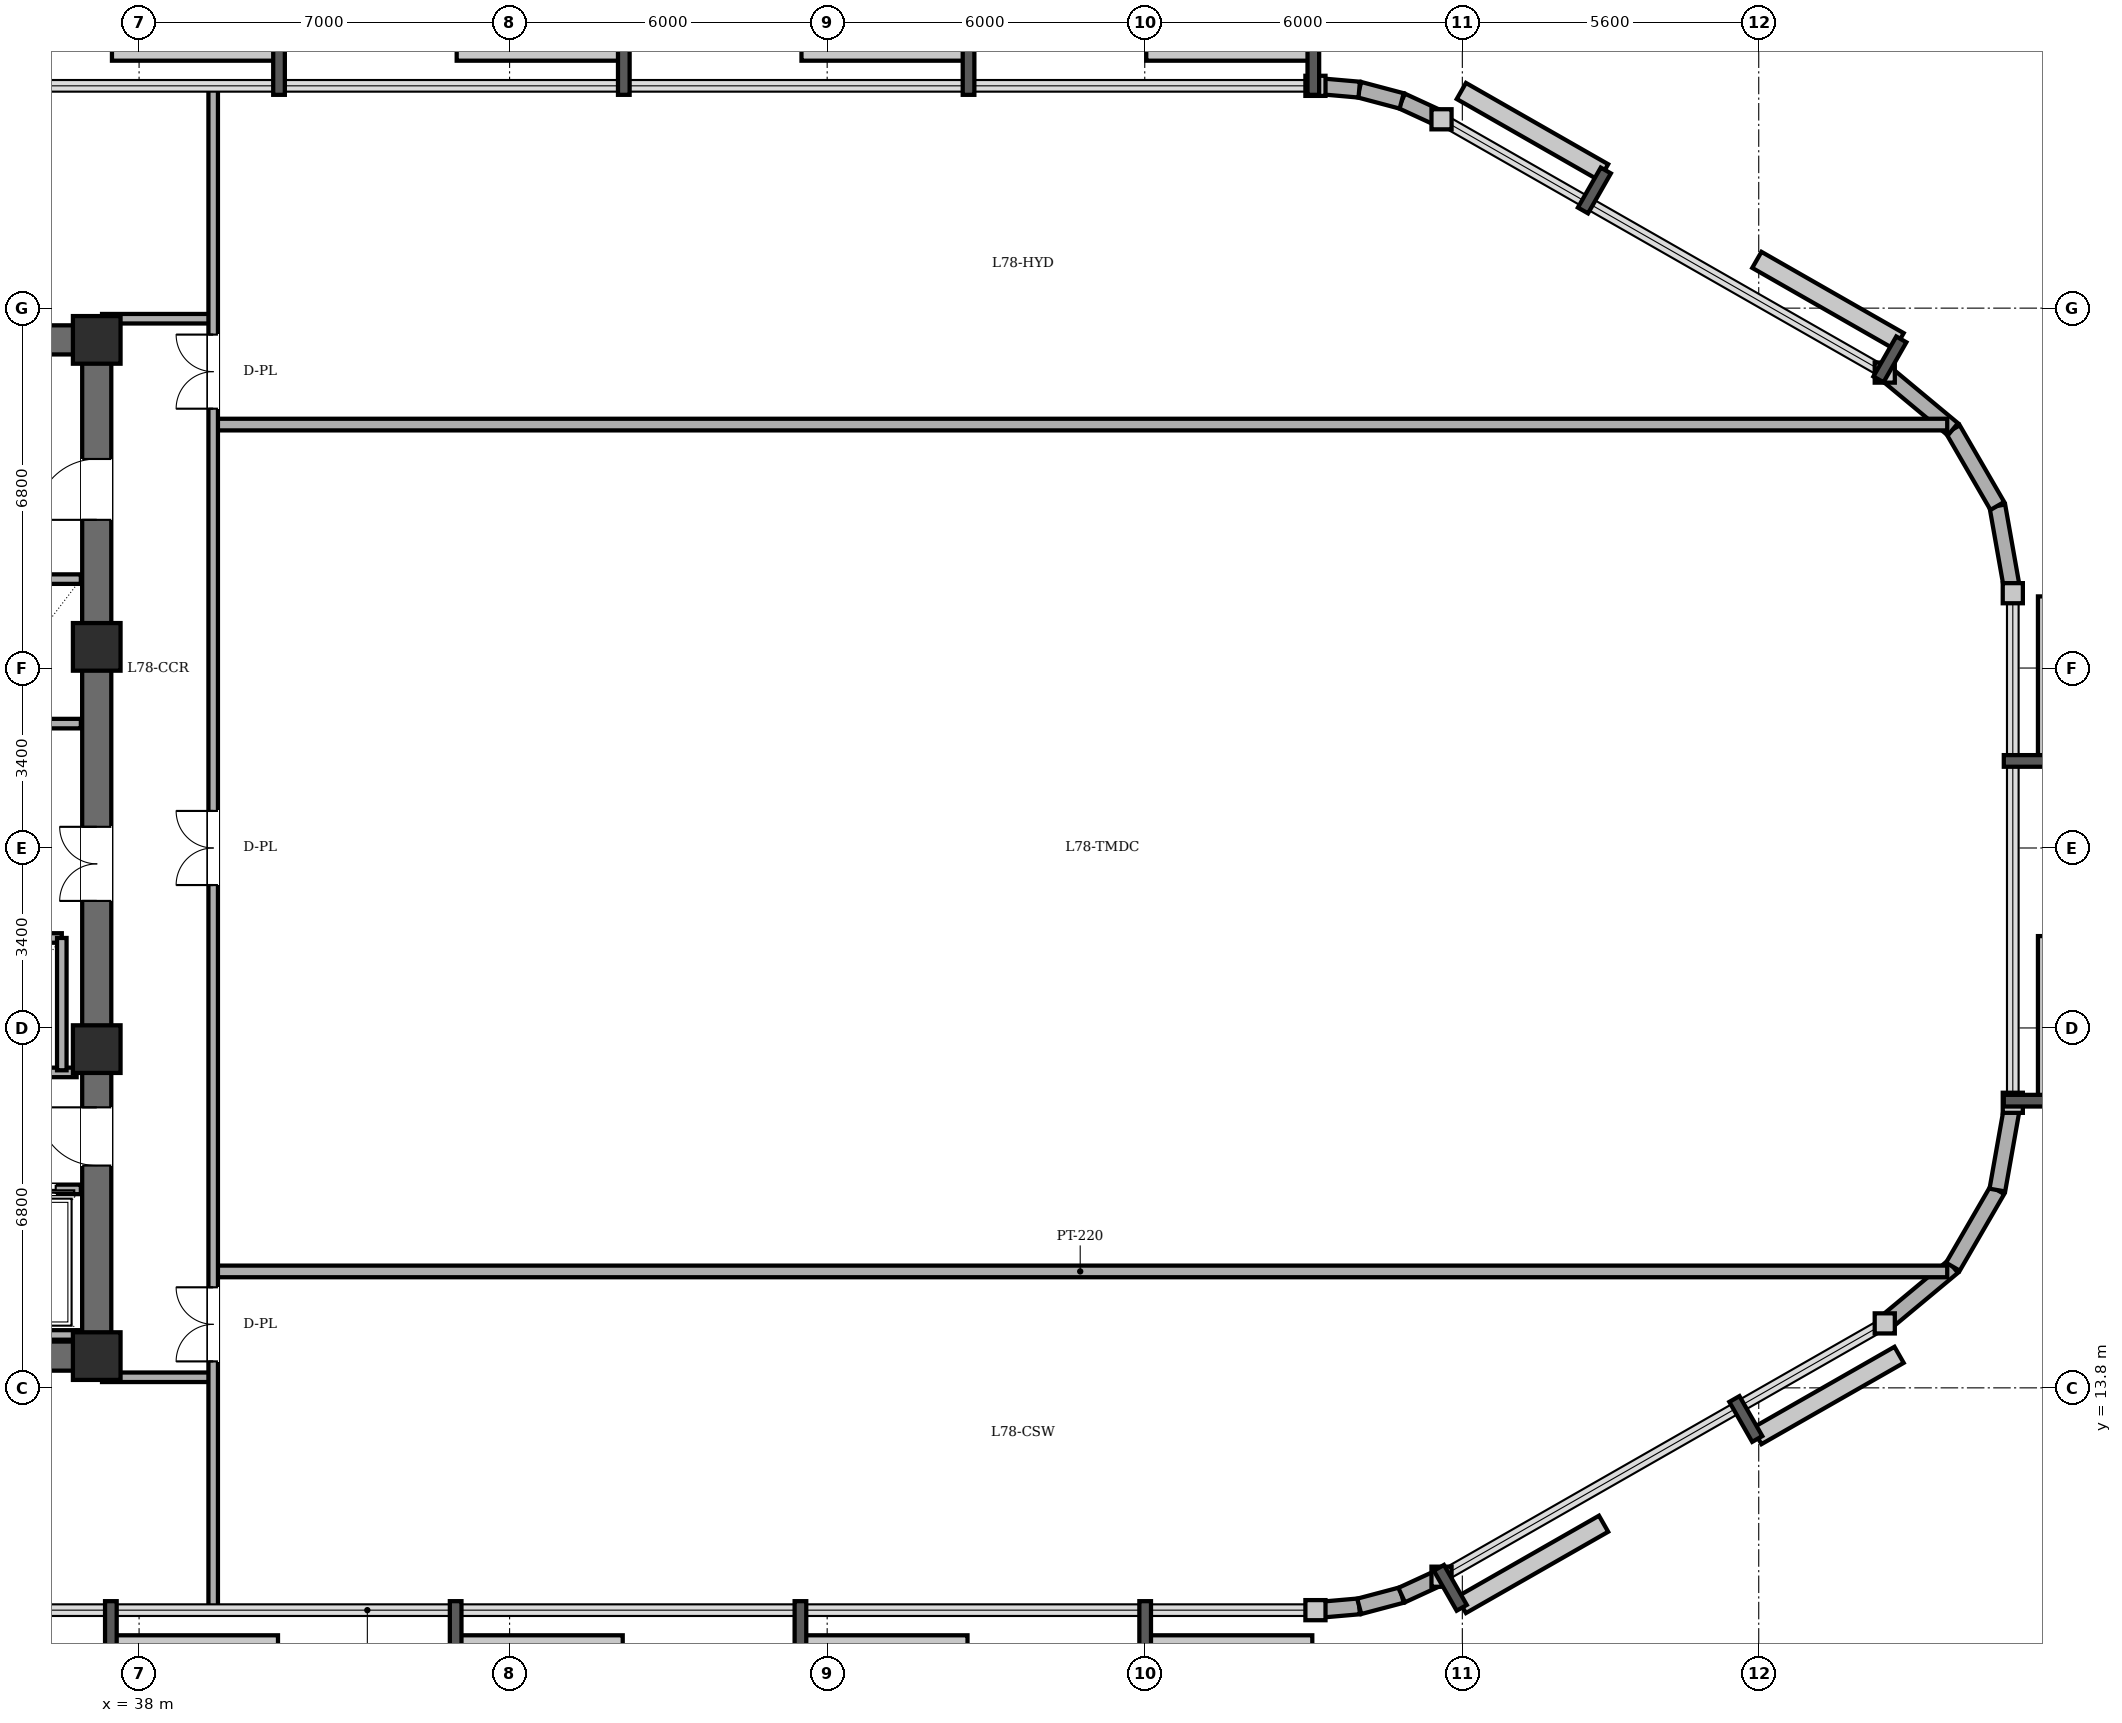
"""IFC4 building model, lengths in metres.
Left out: names, types, materials, properties, quantities, classifications, styles, units other than length and angle.
Written with IfcOpenShell. Run it as: python <this file> out.ifc"""

import sys

from ifc_helpers import new_model, si_unit, direction, frame, frame_2d, origin, origin_2d, place, context, subcontext, project, spatial, rectangle, extrude, element, fill, save


model = new_model("IFC4")
c1 = context("Model", 3, precision=1e-05, world=origin(), true_north=direction((0.0, 1.0)))
c2 = subcontext(c1, "Body", "Model", "MODEL_VIEW")
j1 = project(units=[si_unit("LENGTHUNIT", "METRE"), si_unit("PLANEANGLEUNIT", "RADIAN")], contexts=[c1])
p1 = place(None, origin())
s1 = spatial("IfcSite", under=j1, at=p1, CompositionType="ELEMENT")
p2 = place(p1, origin())
s2 = spatial("IfcBuilding", under=s1, at=p2, CompositionType="ELEMENT")
p3 = place(p2, frame((0.0, 0.0, 300.4)))
s3 = spatial("IfcBuildingStorey", under=s2, at=p3, CompositionType="ELEMENT", Elevation=300.4)
for number, where, z_axis, x_axis in (
    (1, (37.2, 14.4, 0.0), (0.0, 0.0, 1.0), (1.0, 0.0, 0.0)),
    (2, (37.2, 20.2, 0.0), (0.0, 0.0, 1.0), (1.0, 0.0, 0.0)),
    (3, (37.2, 27.8, 0.0), (0.0, 0.0, 1.0), (1.0, 0.0, 0.0)),
    (4, (37.2, 33.6, 0.0), (0.0, 0.0, 1.0), (1.0, 0.0, 0.0)),
):
    element("IfcColumn", number, at=place(p3, frame(where, z_axis=z_axis, x_axis=x_axis)), inside=s3, PredefinedType="COLUMN", context=c2, shape_type="SweptSolid", body=[
        extrude(rectangle(XDim=0.9, YDim=0.9, at=origin_2d()), origin(), (0.0, 0.0, 1.0), 7.6),
    ])
p4 = place(p3, frame((60.225, 9.6, 0.0), z_axis=(0.0, 0.0, 1.0), x_axis=(0.996228437839, 0.086769232112, 0.0)))
e5 = element("IfcWall", 5, at=p4, inside=s3, PredefinedType="SOLIDWALL", context=c2, shape_type="SweptSolid", body=[
    extrude(rectangle(XDim=0.83, YDim=0.3, at=frame_2d((0.415, 0.0))), origin(), (0.0, 0.0, 1.0), 7.6),
])
p5 = place(p3, frame((61.052, 9.672, 0.0), z_axis=(0.0, 0.0, 1.0), x_axis=(0.966527318468, 0.256563720458, 0.0)))
e6 = element("IfcWall", 6, at=p5, inside=s3, PredefinedType="SOLIDWALL", context=c2, shape_type="SweptSolid", body=[
    extrude(rectangle(XDim=0.83, YDim=0.3, at=frame_2d((0.415, 0.0))), origin(), (0.0, 0.0, 1.0), 7.6),
])
p6 = place(p3, frame((61.854, 9.885, 0.0), z_axis=(0.0, 0.0, 1.0), x_axis=(0.908226401394, 0.418479155766, 0.0)))
e7 = element("IfcWall", 7, at=p6, inside=s3, PredefinedType="SOLIDWALL", context=c2, shape_type="SweptSolid", body=[
    extrude(rectangle(XDim=0.829, YDim=0.3, at=frame_2d((0.415, 0.0))), origin(), (0.0, 0.0, 1.0), 7.6),
])
p7 = place(p3, frame((70.981, 15.018, 0.0), z_axis=(0.0, 0.0, 1.0), x_axis=(0.768675227861, 0.639639268708, 0.0)))
e8 = element("IfcWall", 8, at=p7, inside=s3, PredefinedType="SOLIDWALL", context=c2, shape_type="SweptSolid", body=[
    extrude(rectangle(XDim=1.675, YDim=0.3, at=frame_2d((0.837, 0.0))), origin(), (0.0, 0.0, 1.0), 7.6),
])
p8 = place(p3, frame((72.268, 16.089, 0.0), z_axis=(0.0, 0.0, 1.0), x_axis=(0.501720272484, 0.865029923285, 0.0)))
e9 = element("IfcWall", 9, at=p8, inside=s3, PredefinedType="SOLIDWALL", context=c2, shape_type="SweptSolid", body=[
    extrude(rectangle(XDim=1.674, YDim=0.3, at=frame_2d((0.837, 0.0))), origin(), (0.0, 0.0, 1.0), 7.6),
])
for number, where, z_axis, x_axis in (
    (10, (73.108, 17.537, 0.0), (0.0, 0.0, 1.0), (0.174, 0.985, 0.0)),
    (11, (73.4, 28.814, 0.0), (0.0, 0.0, 1.0), (-0.174, 0.985, 0.0)),
):
    element("IfcWall", number, at=place(p3, frame(where, z_axis=z_axis, x_axis=x_axis)), inside=s3, PredefinedType="SOLIDWALL", context=c2, shape_type="SweptSolid", body=[
        extrude(rectangle(XDim=1.675, YDim=0.3, at=frame_2d((0.837, 0.0))), origin(), (0.0, 0.0, 1.0), 7.6),
    ])
p9 = place(p3, frame((73.108, 30.463, 0.0), z_axis=(0.0, 0.0, 1.0), x_axis=(-0.501720272484, 0.865029923285, 0.0)))
e12 = element("IfcWall", 12, at=p9, inside=s3, PredefinedType="SOLIDWALL", context=c2, shape_type="SweptSolid", body=[
    extrude(rectangle(XDim=1.674, YDim=0.3, at=frame_2d((0.837, 0.0))), origin(), (0.0, 0.0, 1.0), 7.6),
])
p10 = place(p3, frame((72.268, 31.911, 0.0), z_axis=(0.0, 0.0, 1.0), x_axis=(-0.768675227861, 0.639639268708, 0.0)))
e13 = element("IfcWall", 13, at=p10, inside=s3, PredefinedType="SOLIDWALL", context=c2, shape_type="SweptSolid", body=[
    extrude(rectangle(XDim=1.675, YDim=0.3, at=frame_2d((0.837, 0.0))), origin(), (0.0, 0.0, 1.0), 7.6),
])
p11 = place(p3, frame((62.607, 37.768, 0.0), z_axis=(0.0, 0.0, 1.0), x_axis=(-0.908226401394, 0.418479155766, 0.0)))
e14 = element("IfcWall", 14, at=p11, inside=s3, PredefinedType="SOLIDWALL", context=c2, shape_type="SweptSolid", body=[
    extrude(rectangle(XDim=0.829, YDim=0.3, at=frame_2d((0.415, 0.0))), origin(), (0.0, 0.0, 1.0), 7.6),
])
p12 = place(p3, frame((61.854, 38.115, 0.0), z_axis=(0.0, 0.0, 1.0), x_axis=(-0.966527318468, 0.256563720458, 0.0)))
e15 = element("IfcWall", 15, at=p12, inside=s3, PredefinedType="SOLIDWALL", context=c2, shape_type="SweptSolid", body=[
    extrude(rectangle(XDim=0.83, YDim=0.3, at=frame_2d((0.415, 0.0))), origin(), (0.0, 0.0, 1.0), 7.6),
])
p13 = place(p3, frame((61.052, 38.328, 0.0), z_axis=(0.0, 0.0, 1.0), x_axis=(-0.996228437839, 0.086769232112, 0.0)))
e16 = element("IfcWall", 16, at=p13, inside=s3, PredefinedType="SOLIDWALL", context=c2, shape_type="SweptSolid", body=[
    extrude(rectangle(XDim=0.83, YDim=0.3, at=frame_2d((0.415, 0.0))), origin(), (0.0, 0.0, 1.0), 7.6),
])
for number, where, z_axis, x_axis in (
    (17, (21.6, 33.6, 0.0), (0.0, 0.0, 1.0), (1.0, 0.0, 0.0)),
    (18, (37.2, 14.4, 0.0), (0.0, 0.0, 1.0), (-1.0, 0.0, 0.0)),
):
    element("IfcWall", number, at=place(p3, frame(where, z_axis=z_axis, x_axis=x_axis)), inside=s3, PredefinedType="SHEAR", context=c2, shape_type="SweptSolid", body=[
        extrude(rectangle(XDim=15.6, YDim=0.55, at=frame_2d((7.8, 0.0))), origin(), (0.0, 0.0, 1.0), 7.38),
    ])
p14 = place(p3, frame((37.2, 14.4, 0.0), z_axis=(0.0, 0.0, 1.0), x_axis=(0.0, 1.0, 0.0)))
e19 = element("IfcWall", 19, at=p14, inside=s3, PredefinedType="SHEAR", context=c2, shape_type="SweptSolid", body=[
    extrude(rectangle(XDim=19.2, YDim=0.55, at=frame_2d((9.6, 0.0))), origin(), (0.0, 0.0, 1.0), 7.38),
])
p15 = place(p14, frame((15.8, 0.0, 0.0)))
e20 = element("IfcOpeningElement", 20, at=p15, cuts=e19, PredefinedType="OPENING", context=c2, shape_type="SweptSolid", body=[
    extrude(rectangle(XDim=1.15, YDim=2.15, at=frame_2d((0.575, 1.075))), frame((0.0, 0.285, 0.0), z_axis=(0.0, -1.0, 0.0), x_axis=(1.0, 0.0, 0.0)), (0.0, 0.0, 1.0), 0.57),
])
p16 = place(p14, frame((3.6, 0.0, 0.0)))
e21 = element("IfcOpeningElement", 21, at=p16, cuts=e19, PredefinedType="OPENING", context=c2, shape_type="SweptSolid", body=[
    extrude(rectangle(XDim=1.1, YDim=2.15, at=frame_2d((0.55, 1.075))), frame((0.0, 0.285, 0.0), z_axis=(0.0, -1.0, 0.0), x_axis=(1.0, 0.0, 0.0)), (0.0, 0.0, 1.0), 0.57),
])
p17 = place(p14, frame((8.6, 0.0, 0.0)))
e22 = element("IfcOpeningElement", 22, at=p17, cuts=e19, PredefinedType="OPENING", context=c2, shape_type="SweptSolid", body=[
    extrude(rectangle(XDim=1.4, YDim=2.25, at=frame_2d((0.7, 1.125))), frame((0.0, 0.285, 0.0), z_axis=(0.0, -1.0, 0.0), x_axis=(1.0, 0.0, 0.0)), (0.0, 0.0, 1.0), 0.57),
])
p18 = place(p3, frame((21.95, 19.76, 0.0), z_axis=(0.0, 0.0, 1.0), x_axis=(1.0, 0.0, 0.0)))
e23 = element("IfcWall", 23, at=p18, inside=s3, PredefinedType="PARTITIONING", context=c2, shape_type="SweptSolid", body=[
    extrude(rectangle(XDim=14.87, YDim=0.18, at=frame_2d((7.435, 0.0))), origin(), (0.0, 0.0, 1.0), 7.38),
])
for number, where, z_axis, x_axis in (
    (24, (34.82, 29.08, 0.0), (0.0, 0.0, 1.0), (1.0, 0.0, 0.0)),
    (25, (36.9, 26.35, 0.0), (0.0, 0.0, 1.0), (-1.0, 0.0, 0.0)),
):
    element("IfcWall", number, at=place(p3, frame(where, z_axis=z_axis, x_axis=x_axis)), inside=s3, PredefinedType="PARTITIONING", context=c2, shape_type="SweptSolid", body=[
        extrude(rectangle(XDim=2.08, YDim=0.18, at=frame_2d((1.04, 0.0))), origin(), (0.0, 0.0, 1.0), 7.38),
    ])
p19 = place(p3, frame((34.55, 17.55, 0.0), z_axis=(0.0, 0.0, 1.0), x_axis=(1.0, 0.0, 0.0)))
e26 = element("IfcWall", 26, at=p19, inside=s3, PredefinedType="PARTITIONING", context=c2, shape_type="SweptSolid", body=[
    extrude(rectangle(XDim=2.35, YDim=0.18, at=frame_2d((1.175, 0.0))), origin(), (0.0, 0.0, 1.0), 7.38),
])
p20 = place(p19, frame((0.475, 0.0, 0.0)))
e27 = element("IfcOpeningElement", 27, at=p20, cuts=e26, PredefinedType="OPENING", context=c2, shape_type="SweptSolid", body=[
    extrude(rectangle(XDim=1.4, YDim=2.3, at=frame_2d((0.7, 1.15))), frame((0.0, 0.1, 0.0), z_axis=(0.0, -1.0, 0.0), x_axis=(1.0, 0.0, 0.0)), (0.0, 0.0, 1.0), 0.2),
])
p21 = place(p3, frame((36.9, 14.8, 0.0), z_axis=(0.0, 0.0, 1.0), x_axis=(-1.0, 0.0, 0.0)))
e28 = element("IfcWall", 28, at=p21, inside=s3, PredefinedType="PARTITIONING", context=c2, shape_type="SweptSolid", body=[
    extrude(rectangle(XDim=2.35, YDim=0.18, at=frame_2d((1.175, 0.0))), origin(), (0.0, 0.0, 1.0), 7.38),
])
p22 = place(p3, frame((34.64, 22.3, 0.0), z_axis=(0.0, 0.0, 1.0), x_axis=(1.0, 0.0, 0.0)))
e29 = element("IfcWall", 29, at=p22, inside=s3, PredefinedType="PARTITIONING", context=c2, shape_type="SweptSolid", body=[
    extrude(rectangle(XDim=1.9, YDim=0.18, at=frame_2d((0.95, 0.0))), origin(), (0.0, 0.0, 1.0), 7.38),
])
p23 = place(p3, frame((36.54, 19.8, 0.0), z_axis=(0.0, 0.0, 1.0), x_axis=(0.0, 1.0, 0.0)))
e30 = element("IfcWall", 30, at=p23, inside=s3, PredefinedType="PARTITIONING", context=c2, shape_type="SweptSolid", body=[
    extrude(rectangle(XDim=2.5, YDim=0.18, at=frame_2d((1.25, 0.0))), origin(), (0.0, 0.0, 1.0), 7.38),
])
p24 = place(p3, frame((37.3, 14.0, 0.0), z_axis=(0.0, 0.0, 1.0), x_axis=(1.0, 0.0, 0.0)))
e31 = element("IfcWall", 31, at=p24, inside=s3, PredefinedType="PARTITIONING", context=c2, shape_type="SweptSolid", body=[
    extrude(rectangle(XDim=2.1, YDim=0.18, at=frame_2d((1.05, 0.0))), origin(), (0.0, 0.0, 1.0), 7.38),
])
for number, where, z_axis, x_axis in (
    (32, (39.4, 16.0, 0.0), (0.0, 0.0, 1.0), (1.0, 0.0, 0.0)),
    (33, (39.4, 32.0, 0.0), (0.0, 0.0, 1.0), (1.0, 0.0, 0.0)),
):
    element("IfcWall", number, at=place(p3, frame(where, z_axis=z_axis, x_axis=x_axis)), inside=s3, PredefinedType="PARTITIONING", context=c2, shape_type="SweptSolid", body=[
        extrude(rectangle(XDim=32.761, YDim=0.22, at=frame_2d((16.38, 0.0))), origin(), (0.0, 0.0, 1.0), 6.862),
    ])
p25 = place(p3, frame((37.3, 34.0, 0.0), z_axis=(0.0, 0.0, 1.0), x_axis=(1.0, 0.0, 0.0)))
e34 = element("IfcWall", 34, at=p25, inside=s3, PredefinedType="PARTITIONING", context=c2, shape_type="SweptSolid", body=[
    extrude(rectangle(XDim=2.1, YDim=0.18, at=frame_2d((1.05, 0.0))), origin(), (0.0, 0.0, 1.0), 7.38),
])
p26 = place(p3, frame((39.4, 9.6, 0.0), z_axis=(0.0, 0.0, 1.0), x_axis=(0.0, 1.0, 0.0)))
e35 = element("IfcWall", 35, at=p26, inside=s3, PredefinedType="PARTITIONING", context=c2, shape_type="SweptSolid", body=[
    extrude(rectangle(XDim=28.8, YDim=0.18, at=frame_2d((14.4, 0.0))), origin(), (0.0, 0.0, 1.0), 7.38),
])
p27 = place(p26, frame((13.7, 0.0, 0.0)))
e36 = element("IfcOpeningElement", 36, at=p27, cuts=e35, PredefinedType="OPENING", context=c2, shape_type="SweptSolid", body=[
    extrude(rectangle(XDim=1.4, YDim=2.25, at=frame_2d((0.7, 1.125))), frame((0.0, 0.1, 0.0), z_axis=(0.0, -1.0, 0.0), x_axis=(1.0, 0.0, 0.0)), (0.0, 0.0, 1.0), 0.2),
])
p28 = place(p26, frame((22.7, 0.0, 0.0)))
e37 = element("IfcOpeningElement", 37, at=p28, cuts=e35, PredefinedType="OPENING", context=c2, shape_type="SweptSolid", body=[
    extrude(rectangle(XDim=1.4, YDim=2.25, at=frame_2d((0.7, 1.125))), frame((0.0, 0.1, 0.0), z_axis=(0.0, -1.0, 0.0), x_axis=(1.0, 0.0, 0.0)), (0.0, 0.0, 1.0), 0.2),
])
p29 = place(p26, frame((4.7, 0.0, 0.0)))
e38 = element("IfcOpeningElement", 38, at=p29, cuts=e35, PredefinedType="OPENING", context=c2, shape_type="SweptSolid", body=[
    extrude(rectangle(XDim=1.4, YDim=2.25, at=frame_2d((0.7, 1.125))), frame((0.0, 0.1, 0.0), z_axis=(0.0, -1.0, 0.0), x_axis=(1.0, 0.0, 0.0)), (0.0, 0.0, 1.0), 0.2),
])
p30 = place(p15, origin())
e39 = element("IfcDoor", 39, at=p30, inside=s3, OperationType="SINGLE_SWING_LEFT", PredefinedType="DOOR", context=c2, shape_type="SweptSolid", body=[
    extrude(rectangle(XDim=1.15, YDim=2.15, at=frame_2d((0.575, 1.075))), frame((0.0, 0.025, 0.0), z_axis=(0.0, -1.0, 0.0), x_axis=(1.0, 0.0, 0.0)), (0.0, 0.0, 1.0), 0.05),
])
fill(e20, e39)
p31 = place(p16, origin())
e40 = element("IfcDoor", 40, at=p31, inside=s3, OperationType="SINGLE_SWING_RIGHT", PredefinedType="DOOR", context=c2, shape_type="SweptSolid", body=[
    extrude(rectangle(XDim=1.1, YDim=2.15, at=frame_2d((0.55, 1.075))), frame((0.0, 0.025, 0.0), z_axis=(0.0, -1.0, 0.0), x_axis=(1.0, 0.0, 0.0)), (0.0, 0.0, 1.0), 0.05),
])
fill(e21, e40)
p32 = place(p20, origin())
e41 = element("IfcDoor", 41, at=p32, inside=s3, OperationType="DOUBLE_DOOR_SLIDING", PredefinedType="DOOR", context=c2, shape_type="SweptSolid", body=[
    extrude(rectangle(XDim=1.4, YDim=2.3, at=frame_2d((0.7, 1.15))), frame((0.0, 0.025, 0.0), z_axis=(0.0, -1.0, 0.0), x_axis=(1.0, 0.0, 0.0)), (0.0, 0.0, 1.0), 0.05),
])
fill(e27, e41)
p33 = place(p17, origin())
e42 = element("IfcDoor", 42, at=p33, inside=s3, OperationType="DOUBLE_DOOR_SINGLE_SWING", PredefinedType="DOOR", context=c2, shape_type="SweptSolid", body=[
    extrude(rectangle(XDim=1.4, YDim=2.25, at=frame_2d((0.7, 1.125))), frame((0.0, 0.025, 0.0), z_axis=(0.0, -1.0, 0.0), x_axis=(1.0, 0.0, 0.0)), (0.0, 0.0, 1.0), 0.05),
])
fill(e22, e42)
p34 = place(p27, origin())
e43 = element("IfcDoor", 43, at=p34, inside=s3, OperationType="DOUBLE_DOOR_SINGLE_SWING", PredefinedType="DOOR", context=c2, shape_type="SweptSolid", body=[
    extrude(rectangle(XDim=1.4, YDim=2.25, at=frame_2d((0.7, 1.125))), frame((0.0, 0.025, 0.0), z_axis=(0.0, -1.0, 0.0), x_axis=(1.0, 0.0, 0.0)), (0.0, 0.0, 1.0), 0.05),
])
fill(e36, e43)
p35 = place(p28, origin())
e44 = element("IfcDoor", 44, at=p35, inside=s3, OperationType="DOUBLE_DOOR_SINGLE_SWING", PredefinedType="DOOR", context=c2, shape_type="SweptSolid", body=[
    extrude(rectangle(XDim=1.4, YDim=2.25, at=frame_2d((0.7, 1.125))), frame((0.0, 0.025, 0.0), z_axis=(0.0, -1.0, 0.0), x_axis=(1.0, 0.0, 0.0)), (0.0, 0.0, 1.0), 0.05),
])
fill(e37, e44)
p36 = place(p29, origin())
e45 = element("IfcDoor", 45, at=p36, inside=s3, OperationType="DOUBLE_DOOR_SINGLE_SWING", PredefinedType="DOOR", context=c2, shape_type="SweptSolid", body=[
    extrude(rectangle(XDim=1.4, YDim=2.25, at=frame_2d((0.7, 1.125))), frame((0.0, 0.025, 0.0), z_axis=(0.0, -1.0, 0.0), x_axis=(1.0, 0.0, 0.0)), (0.0, 0.0, 1.0), 0.05),
])
fill(e38, e45)
save(model, sys.argv[1])
